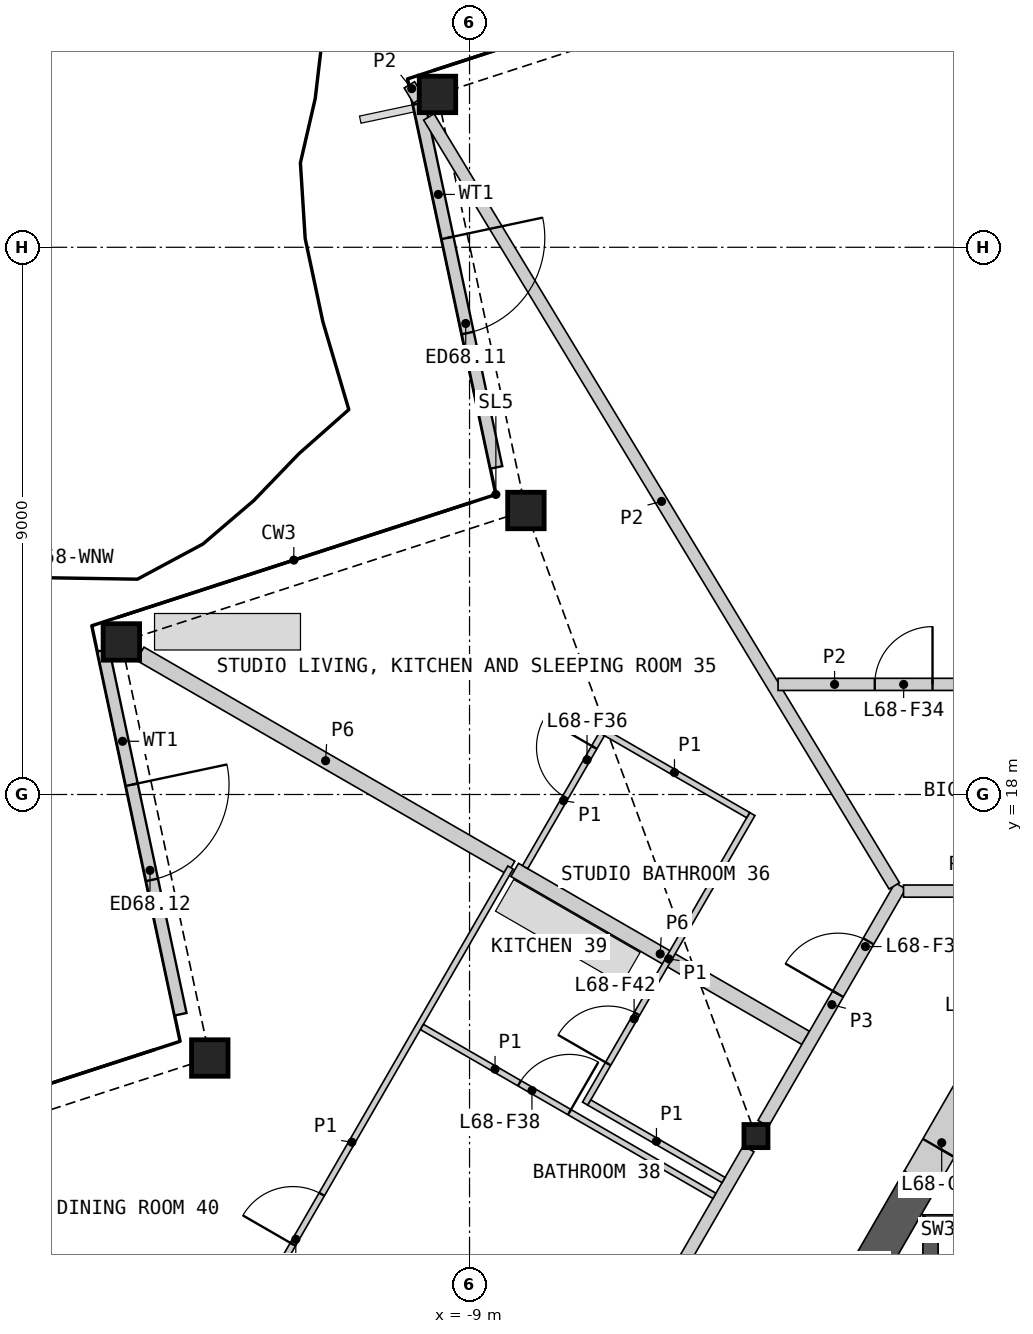
"""IFC4 building model, lengths in metres.
Left out: names, types, materials, properties, quantities, classifications, styles, units other than length and angle.
Written with IfcOpenShell. Run it as: python <this file> out.ifc"""

import sys

from ifc_helpers import new_model, si_unit, direction, frame, frame_2d, origin, origin_2d, place, context, subcontext, project, spatial, polyline, rectangle, hollow_rectangle, i_section, outline, extrude, element, fill, save


model = new_model("IFC4")
c1 = context("Model", 3, precision=1e-05, world=origin(), true_north=direction((0.0, 1.0)))
c2 = subcontext(c1, "Body", "Model", "MODEL_VIEW")
j1 = project(units=[si_unit("LENGTHUNIT", "METRE"), si_unit("PLANEANGLEUNIT", "RADIAN")], contexts=[c1])
p1 = place(None, origin())
s1 = spatial("IfcSite", under=j1, at=p1, CompositionType="ELEMENT")
p2 = place(p1, origin())
s2 = spatial("IfcBuilding", under=s1, at=p2, CompositionType="ELEMENT")
p3 = place(p2, frame((0.0, 0.0, 312.0)))
s3 = spatial("IfcBuildingStorey", under=s2, at=p3, CompositionType="ELEMENT", Elevation=312.0)
for number, where, z_axis, x_axis in (
    (1, (-9.527, 29.514, 0.0), (0.0, 0.0, 1.0), (1.0, 0.0, 0.0)),
    (2, (-8.073, 22.671, 0.0), (0.0, 0.0, 1.0), (1.0, 0.0, 0.0)),
    (3, (-14.727, 20.509, 0.0), (0.0, 0.0, 1.0), (1.0, 0.0, 0.0)),
    (4, (-13.272, 13.666, 0.0), (0.0, 0.0, 1.0), (1.0, 0.0, 0.0)),
):
    element("IfcColumn", number, at=place(p3, frame(where, z_axis=z_axis, x_axis=x_axis)), inside=s3, PredefinedType="COLUMN", context=c2, shape_type="SweptSolid", body=[
        extrude(hollow_rectangle(XDim=0.6, YDim=0.6, WallThickness=0.04, at=origin_2d()), origin(), (0.0, 0.0, 1.0), 3.4),
    ])
p4 = place(p3, frame((-4.289, 12.382, 0.0), z_axis=(0.0, 0.0, 1.0), x_axis=(1.0, 0.0, 0.0)))
e5 = element("IfcColumn", 5, at=p4, inside=s3, PredefinedType="COLUMN", context=c2, shape_type="SweptSolid", body=[
    extrude(i_section(OverallWidth=0.396, OverallDepth=0.381, WebThickness=0.019, FlangeThickness=0.03, at=origin_2d()), origin(), (0.0, 0.0, 1.0), 3.4),
])
p5 = place(p3, frame((-9.832, 29.366, 0.0), z_axis=(0.0, 0.0, 1.0), x_axis=(0.207932234858, -0.978143233738, 0.0)))
e6 = element("IfcWall", 6, at=p5, inside=s3, PredefinedType="SOLIDWALL", context=c2, shape_type="SweptSolid", body=[
    extrude(rectangle(XDim=6.12, YDim=0.2, at=frame_2d((3.06, 0.0))), origin(), (0.0, 0.0, 1.0), 2.488),
])
p6 = place(p5, frame((2.26, 0.0, 0.0)))
e7 = element("IfcOpeningElement", 7, at=p6, cuts=e6, PredefinedType="OPENING", context=c2, shape_type="SweptSolid", body=[
    extrude(rectangle(XDim=1.6, YDim=2.25, at=frame_2d((0.8, 1.125))), frame((0.0, 0.11, 0.0), z_axis=(0.0, -1.0, 0.0), x_axis=(1.0, 0.0, 0.0)), (0.0, 0.0, 1.0), 0.22),
])
p7 = place(p3, frame((-15.025, 20.372, 0.0), z_axis=(0.0, 0.0, 1.0), x_axis=(0.207932234858, -0.978143233738, 0.0)))
e8 = element("IfcWall", 8, at=p7, inside=s3, PredefinedType="SOLIDWALL", context=c2, shape_type="SweptSolid", body=[
    extrude(rectangle(XDim=6.12, YDim=0.2, at=frame_2d((3.06, 0.0))), origin(), (0.0, 0.0, 1.0), 2.488),
])
p8 = place(p7, frame((2.26, 0.0, 0.0)))
e9 = element("IfcOpeningElement", 9, at=p8, cuts=e8, PredefinedType="OPENING", context=c2, shape_type="SweptSolid", body=[
    extrude(rectangle(XDim=1.6, YDim=2.25, at=frame_2d((0.8, 1.125))), frame((0.0, 0.11, 0.0), z_axis=(0.0, -1.0, 0.0), x_axis=(1.0, 0.0, 0.0)), (0.0, 0.0, 1.0), 0.22),
])
p9 = place(p3, origin())
e10 = element("IfcWall", 10, at=p9, inside=s3, PredefinedType="SHEAR", context=c2, shape_type="SweptSolid", body=[
    extrude(outline(polyline([(1.544, 11.087), (-1.544, 11.087), (-1.294, 10.837), (1.294, 10.837), (1.544, 11.087)])), origin(), (0.0, 0.0, 1.0), 3.1),
])
p10 = place(p3, origin())
e11 = element("IfcWall", 11, at=p10, inside=s3, PredefinedType="SHEAR", context=c2, shape_type="SweptSolid", body=[
    extrude(outline(polyline([(-1.294, 10.837), (-1.544, 11.087), (-1.544, 5.237), (-1.294, 5.237), (-1.294, 10.837)])), origin(), (0.0, 0.0, 1.0), 3.1),
])
p11 = place(p3, frame((-1.59, 11.658, 0.0), z_axis=(0.0, 0.0, 1.0), x_axis=(-0.500037594623, -0.866003697431, 0.0)))
e12 = element("IfcWall", 12, at=p11, inside=s3, PredefinedType="SHEAR", context=c2, shape_type="SweptSolid", body=[
    extrude(rectangle(XDim=1.542, YDim=0.6, at=frame_2d((0.771, 0.0))), origin(), (0.0, 0.0, 1.0), 3.1),
])
p12 = place(p3, frame((-2.361, 10.322, 0.0), z_axis=(0.0, 0.0, 1.0), x_axis=(-0.499946605688, -0.86605622881, 0.0)))
e13 = element("IfcWall", 13, at=p12, inside=s3, PredefinedType="SHEAR", context=c2, shape_type="SweptSolid", body=[
    extrude(rectangle(XDim=2.2, YDim=0.6, at=frame_2d((1.1, 0.0))), origin(), (0.0, 0.0, 1.0), 3.1),
])
p13 = place(p12, frame((0.75, 0.0, 0.0)))
e14 = element("IfcOpeningElement", 14, at=p13, cuts=e13, PredefinedType="OPENING", context=c2, shape_type="SweptSolid", body=[
    extrude(rectangle(XDim=1.0, YDim=2.1, at=frame_2d((0.5, 1.05))), frame((0.0, 0.31, 0.0), z_axis=(0.0, -1.0, 0.0), x_axis=(1.0, 0.0, 0.0)), (0.0, 0.0, 1.0), 0.62),
])
p14 = place(p3, frame((-0.26, 13.961, 0.0), z_axis=(0.0, 0.0, 1.0), x_axis=(-0.49997936161, -0.866037319036, 0.0)))
e15 = element("IfcWall", 15, at=p14, inside=s3, PredefinedType="SHEAR", context=c2, shape_type="SweptSolid", body=[
    extrude(rectangle(XDim=2.66, YDim=0.6, at=frame_2d((1.33, 0.0))), origin(), (0.0, 0.0, 1.0), 3.1),
])
p15 = place(p14, frame((1.05, 0.0, 0.0)))
e16 = element("IfcOpeningElement", 16, at=p15, cuts=e15, PredefinedType="OPENING", context=c2, shape_type="SweptSolid", body=[
    extrude(rectangle(XDim=1.0, YDim=2.1, at=frame_2d((0.5, 1.05))), frame((0.0, 0.31, 0.0), z_axis=(0.0, -1.0, 0.0), x_axis=(1.0, 0.0, 0.0)), (0.0, 0.0, 1.0), 0.62),
])
p16 = place(p3, frame((-8.458, 5.16, 0.0), z_axis=(0.0, 0.0, 1.0), x_axis=(0.499984266882, 0.866034487114, 0.0)))
e17 = element("IfcWall", 17, at=p16, inside=s3, PredefinedType="PARTITIONING", context=c2, shape_type="SweptSolid", body=[
    extrude(rectangle(XDim=8.099, YDim=0.2, at=frame_2d((4.049, 0.0))), origin(), (0.0, 0.0, 1.0), 3.1),
])
p17 = place(p16, frame((3.093, 0.0, 0.0)))
e18 = element("IfcOpeningElement", 18, at=p17, cuts=e17, PredefinedType="OPENING", context=c2, shape_type="SweptSolid", body=[
    extrude(rectangle(XDim=1.0, YDim=2.1, at=frame_2d((0.5, 1.05))), frame((0.0, 0.11, 0.0), z_axis=(0.0, -1.0, 0.0), x_axis=(1.0, 0.0, 0.0)), (0.0, 0.0, 1.0), 0.22),
])
p18 = place(p3, frame((-14.417, 20.316, 0.0), z_axis=(0.0, 0.0, 1.0), x_axis=(0.866022207469, -0.50000553614, 0.0)))
e19 = element("IfcWall", 19, at=p18, inside=s3, PredefinedType="PARTITIONING", context=c2, shape_type="SweptSolid", body=[
    extrude(rectangle(XDim=7.042, YDim=0.25, at=frame_2d((3.521, 0.0))), origin(), (0.0, 0.0, 1.0), 2.33),
])
p19 = place(p3, frame((-8.257, 16.76, 0.0), z_axis=(0.0, 0.0, 1.0), x_axis=(0.866034739526, -0.499983829672, 0.0)))
e20 = element("IfcWall", 20, at=p19, inside=s3, PredefinedType="PARTITIONING", context=c2, shape_type="SweptSolid", body=[
    extrude(rectangle(XDim=5.525, YDim=0.25, at=frame_2d((2.763, 0.0))), origin(), (0.0, 0.0, 1.0), 2.33),
])
p20 = place(p3, frame((-4.169, 12.59, 0.0), z_axis=(0.0, 0.0, 1.0), x_axis=(0.499950370306, 0.866054055606, 0.0)))
e21 = element("IfcWall", 21, at=p20, inside=s3, PredefinedType="PARTITIONING", context=c2, shape_type="SweptSolid", body=[
    extrude(rectangle(XDim=4.513, YDim=0.2, at=frame_2d((2.256, 0.0))), origin(), (0.0, 0.0, 1.0), 3.1),
])
p21 = place(p20, frame((2.459, 0.0, 0.0)))
e22 = element("IfcOpeningElement", 22, at=p21, cuts=e21, PredefinedType="OPENING", context=c2, shape_type="SweptSolid", body=[
    extrude(rectangle(XDim=1.0, YDim=2.1, at=frame_2d((0.5, 1.05))), frame((0.0, 0.11, 0.0), z_axis=(0.0, -1.0, 0.0), x_axis=(1.0, 0.0, 0.0)), (0.0, 0.0, 1.0), 0.22),
])
p22 = place(p3, frame((-1.863, 16.411, 0.0), z_axis=(0.0, 0.0, 1.0), x_axis=(1.0, 0.0, 0.0)))
e23 = element("IfcWall", 23, at=p22, inside=s3, PredefinedType="PARTITIONING", context=c2, shape_type="SweptSolid", body=[
    extrude(rectangle(XDim=3.726, YDim=0.2, at=frame_2d((1.863, 0.0))), origin(), (0.0, 0.0, 1.0), 3.1),
])
p23 = place(p22, frame((1.388, 0.0, 0.0)))
e24 = element("IfcOpeningElement", 24, at=p23, cuts=e23, PredefinedType="OPENING", context=c2, shape_type="SweptSolid", body=[
    extrude(rectangle(XDim=0.95, YDim=2.1, at=frame_2d((0.475, 1.05))), frame((0.0, 0.11, 0.0), z_axis=(0.0, -1.0, 0.0), x_axis=(1.0, 0.0, 0.0)), (0.0, 0.0, 1.0), 0.22),
])
p24 = place(p3, frame((-9.669, 29.144, 0.0), z_axis=(0.0, 0.0, 1.0), x_axis=(0.517770554559, -0.85551952218, 0.0)))
e25 = element("IfcWall", 25, at=p24, inside=s3, PredefinedType="PARTITIONING", context=c2, shape_type="SweptSolid", body=[
    extrude(rectangle(XDim=14.784, YDim=0.2, at=frame_2d((7.392, 0.0))), origin(), (0.0, 0.0, 1.0), 2.33),
])
p25 = place(p3, frame((-3.926, 19.811, 0.0), z_axis=(0.0, 0.0, 1.0), x_axis=(1.0, 0.0, 0.0)))
e26 = element("IfcWall", 26, at=p25, inside=s3, PredefinedType="PARTITIONING", context=c2, shape_type="SweptSolid", body=[
    extrude(rectangle(XDim=3.718, YDim=0.2, at=frame_2d((1.859, 0.0))), origin(), (0.0, 0.0, 1.0), 2.33),
])
p26 = place(p25, frame((1.59, 0.0, 0.0)))
e27 = element("IfcOpeningElement", 27, at=p26, cuts=e26, PredefinedType="OPENING", context=c2, shape_type="SweptSolid", body=[
    extrude(rectangle(XDim=0.95, YDim=2.1, at=frame_2d((0.475, 1.05))), frame((0.0, 0.11, 0.0), z_axis=(0.0, -1.0, 0.0), x_axis=(1.0, 0.0, 0.0)), (0.0, 0.0, 1.0), 0.22),
])
p27 = place(p3, frame((-9.989, 29.672, 0.0), z_axis=(0.0, 0.0, 1.0), x_axis=(0.517931387916, -0.855422163268, 0.0)))
e28 = element("IfcWall", 28, at=p27, inside=s3, PredefinedType="PARTITIONING", context=c2, shape_type="SweptSolid", body=[
    extrude(rectangle(XDim=0.292, YDim=0.2, at=frame_2d((0.146, 0.0))), origin(), (0.0, 0.0, 1.0), 2.33),
])
p28 = place(p3, frame((-13.544, 7.762, 0.0), z_axis=(0.0, 0.0, 1.0), x_axis=(0.499993819111, 0.866028972293, 0.0)))
e29 = element("IfcWall", 29, at=p28, inside=s3, PredefinedType="PARTITIONING", context=c2, shape_type="SweptSolid", body=[
    extrude(rectangle(XDim=10.436, YDim=0.1, at=frame_2d((5.218, 0.0))), origin(), (0.0, 0.0, 1.0), 2.33),
])
p29 = place(p28, frame((3.279, 0.0, 0.0)))
e30 = element("IfcOpeningElement", 30, at=p29, cuts=e29, PredefinedType="OPENING", context=c2, shape_type="SweptSolid", body=[
    extrude(rectangle(XDim=0.95, YDim=2.1, at=frame_2d((0.475, 1.05))), frame((0.0, 0.06, 0.0), z_axis=(0.0, -1.0, 0.0), x_axis=(1.0, 0.0, 0.0)), (0.0, 0.0, 1.0), 0.12),
])
p30 = place(p3, frame((-19.615, 11.325, 0.0), z_axis=(0.0, 0.0, 1.0), x_axis=(0.866013987544, -0.500019772988, 0.0)))
e31 = element("IfcWall", 31, at=p30, inside=s3, PredefinedType="PARTITIONING", context=c2, shape_type="SweptSolid", body=[
    extrude(rectangle(XDim=6.99, YDim=0.1, at=frame_2d((3.495, 0.0))), origin(), (0.0, 0.0, 1.0), 2.33),
])
p31 = place(p30, frame((4.48, 0.0, 0.0)))
e32 = element("IfcOpeningElement", 32, at=p31, cuts=e31, PredefinedType="OPENING", context=c2, shape_type="SweptSolid", body=[
    extrude(rectangle(XDim=0.95, YDim=2.1, at=frame_2d((0.475, 1.05))), frame((0.0, 0.06, 0.0), z_axis=(0.0, -1.0, 0.0), x_axis=(1.0, 0.0, 0.0)), (0.0, 0.0, 1.0), 0.12),
])
p32 = place(p3, frame((-9.783, 14.177, 0.0), z_axis=(0.0, 0.0, 1.0), x_axis=(0.866030435321, -0.499991285022, 0.0)))
e33 = element("IfcWall", 33, at=p32, inside=s3, PredefinedType="PARTITIONING", context=c2, shape_type="SweptSolid", body=[
    extrude(rectangle(XDim=5.555, YDim=0.1, at=frame_2d((2.778, 0.0))), origin(), (0.0, 0.0, 1.0), 2.33),
])
p33 = place(p32, frame((1.852, 0.0, 0.0)))
e34 = element("IfcOpeningElement", 34, at=p33, cuts=e33, PredefinedType="OPENING", context=c2, shape_type="SweptSolid", body=[
    extrude(rectangle(XDim=0.95, YDim=2.1, at=frame_2d((0.475, 1.05))), frame((0.0, 0.06, 0.0), z_axis=(0.0, -1.0, 0.0), x_axis=(1.0, 0.0, 0.0)), (0.0, 0.0, 1.0), 0.12),
])
p34 = place(p3, frame((-7.099, 12.915, 0.0), z_axis=(0.0, 0.0, 1.0), x_axis=(0.49997732567, 0.866038494419, 0.0)))
e35 = element("IfcWall", 35, at=p34, inside=s3, PredefinedType="PARTITIONING", context=c2, shape_type="SweptSolid", body=[
    extrude(rectangle(XDim=5.5, YDim=0.1, at=frame_2d((2.75, 0.0))), origin(), (0.0, 0.0, 1.0), 2.33),
])
p35 = place(p34, frame((0.756, 0.0, 0.0)))
e36 = element("IfcOpeningElement", 36, at=p35, cuts=e35, PredefinedType="OPENING", context=c2, shape_type="SweptSolid", body=[
    extrude(rectangle(XDim=0.95, YDim=2.1, at=frame_2d((0.475, 1.05))), frame((0.0, 0.06, 0.0), z_axis=(0.0, -1.0, 0.0), x_axis=(1.0, 0.0, 0.0)), (0.0, 0.0, 1.0), 0.12),
])
p36 = place(p3, frame((-6.842, 19.06, 0.0), z_axis=(0.0, 0.0, 1.0), x_axis=(0.866034573852, -0.49998411664, 0.0)))
e37 = element("IfcWall", 37, at=p36, inside=s3, PredefinedType="PARTITIONING", context=c2, shape_type="SweptSolid", body=[
    extrude(rectangle(XDim=2.8, YDim=0.1, at=frame_2d((1.4, 0.0))), origin(), (0.0, 0.0, 1.0), 2.33),
])
p37 = place(p3, frame((-7.031, 12.934, 0.0), z_axis=(0.0, 0.0, 1.0), x_axis=(0.866030925526, -0.499990435942, 0.0)))
e38 = element("IfcWall", 38, at=p37, inside=s3, PredefinedType="PARTITIONING", context=c2, shape_type="SweptSolid", body=[
    extrude(rectangle(XDim=2.55, YDim=0.1, at=frame_2d((1.275, 0.0))), origin(), (0.0, 0.0, 1.0), 2.33),
])
p38 = place(p3, frame((-8.086, 16.805, 0.0), z_axis=(0.0, 0.0, 1.0), x_axis=(0.50001820224, 0.866014894461, 0.0)))
e39 = element("IfcWall", 39, at=p38, inside=s3, PredefinedType="PARTITIONING", context=c2, shape_type="SweptSolid", body=[
    extrude(rectangle(XDim=2.525, YDim=0.1, at=frame_2d((1.262, 0.0))), origin(), (0.0, 0.0, 1.0), 2.33),
])
p39 = place(p38, frame((1.325, 0.0, 0.0)))
e40 = element("IfcOpeningElement", 40, at=p39, cuts=e39, PredefinedType="OPENING", context=c2, shape_type="SweptSolid", body=[
    extrude(rectangle(XDim=0.95, YDim=2.1, at=frame_2d((0.475, 1.05))), frame((0.0, 0.06, 0.0), z_axis=(0.0, -1.0, 0.0), x_axis=(1.0, 0.0, 0.0)), (0.0, 0.0, 1.0), 0.12),
])
p40 = place(p6, origin())
e41 = element("IfcDoor", 41, at=p40, inside=s3, OperationType="DOUBLE_DOOR_SINGLE_SWING", PredefinedType="DOOR", context=c2, shape_type="SweptSolid", body=[
    extrude(rectangle(XDim=1.6, YDim=2.25, at=frame_2d((0.8, 1.125))), frame((0.0, 0.025, 0.0), z_axis=(0.0, -1.0, 0.0), x_axis=(1.0, 0.0, 0.0)), (0.0, 0.0, 1.0), 0.05),
])
fill(e7, e41)
p41 = place(p8, origin())
e42 = element("IfcDoor", 42, at=p41, inside=s3, OperationType="DOUBLE_DOOR_SINGLE_SWING", PredefinedType="DOOR", context=c2, shape_type="SweptSolid", body=[
    extrude(rectangle(XDim=1.6, YDim=2.25, at=frame_2d((0.8, 1.125))), frame((0.0, 0.025, 0.0), z_axis=(0.0, -1.0, 0.0), x_axis=(1.0, 0.0, 0.0)), (0.0, 0.0, 1.0), 0.05),
])
fill(e9, e42)
p42 = place(p15, origin())
e43 = element("IfcDoor", 43, at=p42, inside=s3, OperationType="SINGLE_SWING_RIGHT", PredefinedType="DOOR", context=c2, shape_type="SweptSolid", body=[
    extrude(rectangle(XDim=1.0, YDim=2.1, at=frame_2d((0.5, 1.05))), frame((0.0, 0.055, 0.0), z_axis=(0.0, -1.0, 0.0), x_axis=(1.0, 0.0, 0.0)), (0.0, 0.0, 1.0), 0.05),
])
fill(e16, e43)
p43 = place(p26, origin())
e44 = element("IfcDoor", 44, at=p43, inside=s3, OperationType="SINGLE_SWING_RIGHT", PredefinedType="DOOR", context=c2, shape_type="SweptSolid", body=[
    extrude(rectangle(XDim=0.95, YDim=2.1, at=frame_2d((0.475, 1.05))), frame((0.0, 0.025, 0.0), z_axis=(0.0, -1.0, 0.0), x_axis=(1.0, 0.0, 0.0)), (0.0, 0.0, 1.0), 0.05),
])
fill(e27, e44)
p44 = place(p21, origin())
e45 = element("IfcDoor", 45, at=p44, inside=s3, OperationType="SINGLE_SWING_LEFT", PredefinedType="DOOR", context=c2, shape_type="SweptSolid", body=[
    extrude(rectangle(XDim=1.0, YDim=2.1, at=frame_2d((0.5, 1.05))), frame((0.0, 0.025, 0.0), z_axis=(0.0, -1.0, 0.0), x_axis=(1.0, 0.0, 0.0)), (0.0, 0.0, 1.0), 0.05),
])
fill(e22, e45)
p45 = place(p39, origin())
e46 = element("IfcDoor", 46, at=p45, inside=s3, OperationType="SINGLE_SWING_RIGHT", PredefinedType="DOOR", context=c2, shape_type="SweptSolid", body=[
    extrude(rectangle(XDim=0.95, YDim=2.1, at=frame_2d((0.475, 1.05))), frame((0.0, 0.025, 0.0), z_axis=(0.0, -1.0, 0.0), x_axis=(1.0, 0.0, 0.0)), (0.0, 0.0, 1.0), 0.05),
])
fill(e40, e46)
p46 = place(p33, origin())
e47 = element("IfcDoor", 47, at=p46, inside=s3, OperationType="SINGLE_SWING_RIGHT", PredefinedType="DOOR", context=c2, shape_type="SweptSolid", body=[
    extrude(rectangle(XDim=0.95, YDim=2.1, at=frame_2d((0.475, 1.05))), frame((0.0, 0.025, 0.0), z_axis=(0.0, -1.0, 0.0), x_axis=(1.0, 0.0, 0.0)), (0.0, 0.0, 1.0), 0.05),
])
fill(e34, e47)
p47 = place(p29, origin())
e48 = element("IfcDoor", 48, at=p47, inside=s3, OperationType="SINGLE_SWING_LEFT", PredefinedType="DOOR", context=c2, shape_type="SweptSolid", body=[
    extrude(rectangle(XDim=0.95, YDim=2.1, at=frame_2d((0.475, 1.05))), frame((0.0, 0.025, 0.0), z_axis=(0.0, -1.0, 0.0), x_axis=(1.0, 0.0, 0.0)), (0.0, 0.0, 1.0), 0.05),
])
fill(e30, e48)
p48 = place(p35, origin())
e49 = element("IfcDoor", 49, at=p48, inside=s3, OperationType="SINGLE_SWING_LEFT", PredefinedType="DOOR", context=c2, shape_type="SweptSolid", body=[
    extrude(rectangle(XDim=0.95, YDim=2.1, at=frame_2d((0.475, 1.05))), frame((0.0, 0.025, 0.0), z_axis=(0.0, -1.0, 0.0), x_axis=(1.0, 0.0, 0.0)), (0.0, 0.0, 1.0), 0.05),
])
fill(e36, e49)
save(model, sys.argv[1])
